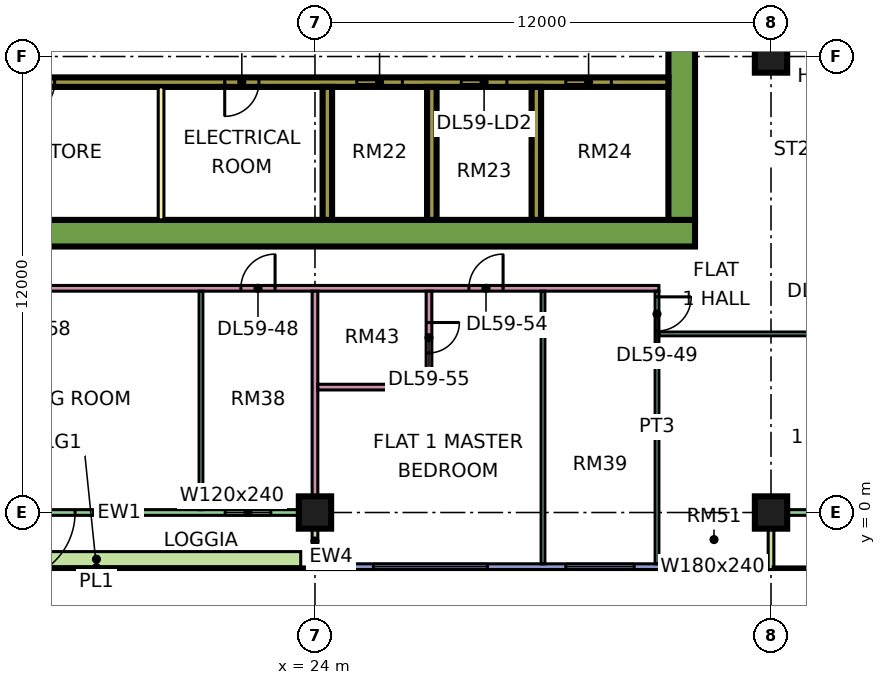
"""IFC4 building model, lengths in metres.
Left out: names, types, materials, properties, quantities, classifications, styles, units other than length and angle.
Written with IfcOpenShell. Run it as: python <this file> out.ifc"""

import sys

from ifc_helpers import new_model, si_unit, direction, frame, frame_2d, origin, origin_2d, place, context, subcontext, project, spatial, rectangle, extrude, element, fill, save


model = new_model("IFC4")
c1 = context("Model", 3, precision=1e-05, world=origin(), true_north=direction((0.0, 1.0)))
c2 = subcontext(c1, "Body", "Model", "MODEL_VIEW")
j1 = project(units=[si_unit("LENGTHUNIT", "METRE"), si_unit("PLANEANGLEUNIT", "RADIAN")], contexts=[c1])
p1 = place(None, origin())
s1 = spatial("IfcSite", under=j1, at=p1, CompositionType="ELEMENT")
p2 = place(p1, origin())
s2 = spatial("IfcBuilding", under=s1, at=p2, CompositionType="ELEMENT")
p3 = place(p2, frame((0.0, 0.0, 249.15)))
s3 = spatial("IfcBuildingStorey", under=s2, at=p3, CompositionType="ELEMENT", Elevation=249.15)
for number, where, z_axis, x_axis in (
    (1, (24.0, 0.0, 0.0), (0.0, 0.0, 1.0), (1.0, 0.0, 0.0)),
    (2, (36.0, 0.0, 0.0), (0.0, 0.0, 1.0), (1.0, 0.0, 0.0)),
    (3, (36.0, 12.0, 0.0), (0.0, 0.0, 1.0), (1.0, 0.0, 0.0)),
):
    element("IfcColumn", number, at=place(p3, frame(where, z_axis=z_axis, x_axis=x_axis)), inside=s3, PredefinedType="COLUMN", context=c2, shape_type="SweptSolid", body=[
        extrude(rectangle(XDim=0.85, YDim=0.85, at=origin_2d()), origin(), (0.0, 0.0, 1.0), 3.75),
    ])
p4 = place(p3, frame((9.0, 7.35, 0.0), z_axis=(0.0, 0.0, 1.0), x_axis=(1.0, 0.0, 0.0)))
e4 = element("IfcWall", 4, at=p4, inside=s3, PredefinedType="SHEAR", context=c2, shape_type="SweptSolid", body=[
    extrude(rectangle(XDim=25.0, YDim=0.7, at=frame_2d((12.5, 0.0))), origin(), (0.0, 0.0, 1.0), 3.75),
])
p5 = place(p3, frame((33.65, 7.7, 0.0), z_axis=(0.0, 0.0, 1.0), x_axis=(0.0, 1.0, 0.0)))
e5 = element("IfcWall", 5, at=p5, inside=s3, PredefinedType="SHEAR", context=c2, shape_type="SweptSolid", body=[
    extrude(rectangle(XDim=11.6, YDim=0.7, at=frame_2d((5.8, 0.0))), origin(), (0.0, 0.0, 1.0), 3.75),
])
p6 = place(p5, frame((5.5, 0.0, 0.0)))
e6 = element("IfcOpeningElement", 6, at=p6, cuts=e5, PredefinedType="OPENING", context=c2, shape_type="SweptSolid", body=[
    extrude(rectangle(XDim=1.8, YDim=2.4, at=frame_2d((0.9, 1.2))), frame((0.0, 0.36, 0.0), z_axis=(0.0, -1.0, 0.0), x_axis=(1.0, 0.0, 0.0)), (0.0, 0.0, 1.0), 0.72),
])
p7 = place(p3, frame((13.45, 11.325, 0.0), z_axis=(0.0, 0.0, 1.0), x_axis=(1.0, 0.0, 0.0)))
e7 = element("IfcWall", 7, at=p7, inside=s3, PredefinedType="SHEAR", context=c2, shape_type="SweptSolid", body=[
    extrude(rectangle(XDim=19.85, YDim=0.25, at=frame_2d((9.925, 0.0))), origin(), (0.0, 0.0, 1.0), 3.75),
])
p8 = place(p7, frame((11.65, 0.0, 0.0)))
e8 = element("IfcOpeningElement", 8, at=p8, cuts=e7, PredefinedType="OPENING", context=c2, shape_type="SweptSolid", body=[
    extrude(rectangle(XDim=1.2, YDim=2.2, at=frame_2d((0.6, 1.1))), frame((0.0, 0.135, 0.0), z_axis=(0.0, -1.0, 0.0), x_axis=(1.0, 0.0, 0.0)), (0.0, 0.0, 1.0), 0.27),
])
p9 = place(p7, frame((14.4, 0.0, 0.0)))
e9 = element("IfcOpeningElement", 9, at=p9, cuts=e7, PredefinedType="OPENING", context=c2, shape_type="SweptSolid", body=[
    extrude(rectangle(XDim=1.2, YDim=2.2, at=frame_2d((0.6, 1.1))), frame((0.0, 0.135, 0.0), z_axis=(0.0, -1.0, 0.0), x_axis=(1.0, 0.0, 0.0)), (0.0, 0.0, 1.0), 0.27),
])
p10 = place(p7, frame((17.15, 0.0, 0.0)))
e10 = element("IfcOpeningElement", 10, at=p10, cuts=e7, PredefinedType="OPENING", context=c2, shape_type="SweptSolid", body=[
    extrude(rectangle(XDim=1.2, YDim=2.2, at=frame_2d((0.6, 1.1))), frame((0.0, 0.135, 0.0), z_axis=(0.0, -1.0, 0.0), x_axis=(1.0, 0.0, 0.0)), (0.0, 0.0, 1.0), 0.27),
])
p11 = place(p7, frame((2.8, 0.0, 0.0)))
e11 = element("IfcOpeningElement", 11, at=p11, cuts=e7, PredefinedType="OPENING", context=c2, shape_type="SweptSolid", body=[
    extrude(rectangle(XDim=0.9, YDim=2.1, at=frame_2d((0.45, 1.05))), frame((0.0, 0.135, 0.0), z_axis=(0.0, -1.0, 0.0), x_axis=(1.0, 0.0, 0.0)), (0.0, 0.0, 1.0), 0.27),
])
p12 = place(p7, frame((8.175, 0.0, 0.0)))
e12 = element("IfcOpeningElement", 12, at=p12, cuts=e7, PredefinedType="OPENING", context=c2, shape_type="SweptSolid", body=[
    extrude(rectangle(XDim=0.9, YDim=2.1, at=frame_2d((0.45, 1.05))), frame((0.0, 0.135, 0.0), z_axis=(0.0, -1.0, 0.0), x_axis=(1.0, 0.0, 0.0)), (0.0, 0.0, 1.0), 0.27),
])
for number, where, z_axis, x_axis in (
    (13, (24.325, 7.7, 0.0), (0.0, 0.0, 1.0), (0.0, 1.0, 0.0)),
    (14, (27.075, 7.7, 0.0), (0.0, 0.0, 1.0), (0.0, 1.0, 0.0)),
    (15, (29.825, 7.7, 0.0), (0.0, 0.0, 1.0), (0.0, 1.0, 0.0)),
):
    element("IfcWall", number, at=place(p3, frame(where, z_axis=z_axis, x_axis=x_axis)), inside=s3, PredefinedType="SHEAR", context=c2, shape_type="SweptSolid", body=[
        extrude(rectangle(XDim=3.5, YDim=0.25, at=frame_2d((1.75, 0.0))), origin(), (0.0, 0.0, 1.0), 3.75),
    ])
p13 = place(p3, frame((12.575, 0.0, 0.0), z_axis=(0.0, 0.0, 1.0), x_axis=(1.0, 0.0, 0.0)))
e16 = element("IfcWall", 16, at=p13, inside=s3, PredefinedType="SOLIDWALL", context=c2, shape_type="SweptSolid", body=[
    extrude(rectangle(XDim=11.35, YDim=0.15, at=frame_2d((5.675, 0.0))), origin(), (0.0, 0.0, 1.0), 3.35),
])
p14 = place(p13, frame((3.312, 0.0, 0.0)))
e17 = element("IfcOpeningElement", 17, at=p14, cuts=e16, PredefinedType="OPENING", context=c2, shape_type="SweptSolid", body=[
    extrude(rectangle(XDim=1.8, YDim=2.4, at=frame_2d((0.9, 1.2))), frame((0.0, 0.085, 0.0), z_axis=(0.0, -1.0, 0.0), x_axis=(1.0, 0.0, 0.0)), (0.0, 0.0, 1.0), 0.17),
])
p15 = place(p13, frame((9.062, 0.0, 0.45)))
e18 = element("IfcOpeningElement", 18, at=p15, cuts=e16, PredefinedType="OPENING", context=c2, shape_type="SweptSolid", body=[
    extrude(rectangle(XDim=1.2, YDim=2.4, at=frame_2d((0.6, 1.2))), frame((0.0, 0.085, 0.0), z_axis=(0.0, -1.0, 0.0), x_axis=(1.0, 0.0, 0.0)), (0.0, 0.0, 1.0), 0.17),
])
p16 = place(p3, frame((24.0, -1.5, 0.0), z_axis=(0.0, 0.0, 1.0), x_axis=(0.0, 1.0, 0.0)))
e19 = element("IfcWall", 19, at=p16, inside=s3, PredefinedType="SOLIDWALL", context=c2, shape_type="SweptSolid", body=[
    extrude(rectangle(XDim=1.5, YDim=0.15, at=frame_2d((0.75, 0.0))), origin(), (0.0, 0.0, 1.0), 3.35),
])
p17 = place(p3, frame((24.075, -1.425, 0.0), z_axis=(0.0, 0.0, 1.0), x_axis=(1.0, 0.0, 0.0)))
e20 = element("IfcWall", 20, at=p17, inside=s3, PredefinedType="SOLIDWALL", context=c2, shape_type="SweptSolid", body=[
    extrude(rectangle(XDim=11.85, YDim=0.15, at=frame_2d((5.925, 0.0))), origin(), (0.0, 0.0, 1.0), 3.35),
])
p18 = place(p17, frame((1.462, 0.0, 0.45)))
e21 = element("IfcOpeningElement", 21, at=p18, cuts=e20, PredefinedType="OPENING", context=c2, shape_type="SweptSolid", body=[
    extrude(rectangle(XDim=3.0, YDim=2.4, at=frame_2d((1.5, 1.2))), frame((0.0, 0.085, 0.0), z_axis=(0.0, -1.0, 0.0), x_axis=(1.0, 0.0, 0.0)), (0.0, 0.0, 1.0), 0.17),
])
p19 = place(p17, frame((6.525, 0.0, 0.45)))
e22 = element("IfcOpeningElement", 22, at=p19, cuts=e20, PredefinedType="OPENING", context=c2, shape_type="SweptSolid", body=[
    extrude(rectangle(XDim=1.8, YDim=2.4, at=frame_2d((0.9, 1.2))), frame((0.0, 0.085, 0.0), z_axis=(0.0, -1.0, 0.0), x_axis=(1.0, 0.0, 0.0)), (0.0, 0.0, 1.0), 0.17),
])
p20 = place(p17, frame((9.488, 0.0, 0.45)))
e23 = element("IfcOpeningElement", 23, at=p20, cuts=e20, PredefinedType="OPENING", context=c2, shape_type="SweptSolid", body=[
    extrude(rectangle(XDim=1.8, YDim=2.4, at=frame_2d((0.9, 1.2))), frame((0.0, 0.085, 0.0), z_axis=(0.0, -1.0, 0.0), x_axis=(1.0, 0.0, 0.0)), (0.0, 0.0, 1.0), 0.17),
])
p21 = place(p3, frame((36.075, 0.0, 0.0), z_axis=(0.0, 0.0, 1.0), x_axis=(1.0, 0.0, 0.0)))
e24 = element("IfcWall", 24, at=p21, inside=s3, PredefinedType="SOLIDWALL", context=c2, shape_type="SweptSolid", body=[
    extrude(rectangle(XDim=11.85, YDim=0.15, at=frame_2d((5.925, 0.0))), origin(), (0.0, 0.0, 1.0), 3.35),
])
p22 = place(p21, frame((2.288, 0.0, 0.0)))
e25 = element("IfcOpeningElement", 25, at=p22, cuts=e24, PredefinedType="OPENING", context=c2, shape_type="SweptSolid", body=[
    extrude(rectangle(XDim=1.8, YDim=2.4, at=frame_2d((0.9, 1.2))), frame((0.0, 0.085, 0.0), z_axis=(0.0, -1.0, 0.0), x_axis=(1.0, 0.0, 0.0)), (0.0, 0.0, 1.0), 0.17),
])
p23 = place(p21, frame((6.562, 0.0, 0.45)))
e26 = element("IfcOpeningElement", 26, at=p23, cuts=e24, PredefinedType="OPENING", context=c2, shape_type="SweptSolid", body=[
    extrude(rectangle(XDim=1.2, YDim=2.4, at=frame_2d((0.6, 1.2))), frame((0.0, 0.085, 0.0), z_axis=(0.0, -1.0, 0.0), x_axis=(1.0, 0.0, 0.0)), (0.0, 0.0, 1.0), 0.17),
])
p24 = place(p21, frame((10.05, 0.0, 0.45)))
e27 = element("IfcOpeningElement", 27, at=p24, cuts=e24, PredefinedType="OPENING", context=c2, shape_type="SweptSolid", body=[
    extrude(rectangle(XDim=1.2, YDim=2.4, at=frame_2d((0.6, 1.2))), frame((0.0, 0.085, 0.0), z_axis=(0.0, -1.0, 0.0), x_axis=(1.0, 0.0, 0.0)), (0.0, 0.0, 1.0), 0.17),
])
p25 = place(p3, frame((36.0, -1.5, 0.0), z_axis=(0.0, 0.0, 1.0), x_axis=(0.0, 1.0, 0.0)))
e28 = element("IfcWall", 28, at=p25, inside=s3, PredefinedType="SOLIDWALL", context=c2, shape_type="SweptSolid", body=[
    extrude(rectangle(XDim=1.5, YDim=0.15, at=frame_2d((0.75, 0.0))), origin(), (0.0, 0.0, 1.0), 3.35),
])
p26 = place(p3, frame((12.875, -1.229, 0.0), z_axis=(0.0, 0.0, 1.0), x_axis=(1.0, 0.0, 0.0)))
e29 = element("IfcWall", 29, at=p26, inside=s3, PredefinedType="SOLIDWALL", context=c2, shape_type="SweptSolid", body=[
    extrude(rectangle(XDim=10.75, YDim=0.4, at=frame_2d((5.375, 0.0))), origin(), (0.0, 0.0, 1.0), 0.7),
])
p27 = place(p3, frame((19.95, 7.7, 0.0), z_axis=(0.0, 0.0, 1.0), x_axis=(0.0, 1.0, 0.0)))
e30 = element("IfcWall", 30, at=p27, inside=s3, PredefinedType="PARTITIONING", context=c2, shape_type="SweptSolid", body=[
    extrude(rectangle(XDim=3.5, YDim=0.15, at=frame_2d((1.75, 0.0))), origin(), (0.0, 0.0, 1.0), 3.35),
])
p28 = place(p3, frame((11.95, 5.9, 0.0), z_axis=(0.0, 0.0, 1.0), x_axis=(1.0, 0.0, 0.0)))
e31 = element("IfcWall", 31, at=p28, inside=s3, PredefinedType="PARTITIONING", context=c2, shape_type="SweptSolid", body=[
    extrude(rectangle(XDim=21.1, YDim=0.15, at=frame_2d((10.55, 0.0))), origin(), (0.0, 0.0, 1.0), 3.35),
])
p29 = place(p28, frame((10.1, 0.0, 0.0)))
e32 = element("IfcOpeningElement", 32, at=p29, cuts=e31, PredefinedType="OPENING", context=c2, shape_type="SweptSolid", body=[
    extrude(rectangle(XDim=0.9, YDim=2.1, at=frame_2d((0.45, 1.05))), frame((0.0, 0.085, 0.0), z_axis=(0.0, -1.0, 0.0), x_axis=(1.0, 0.0, 0.0)), (0.0, 0.0, 1.0), 0.17),
])
p30 = place(p28, frame((16.1, 0.0, 0.0)))
e33 = element("IfcOpeningElement", 33, at=p30, cuts=e31, PredefinedType="OPENING", context=c2, shape_type="SweptSolid", body=[
    extrude(rectangle(XDim=0.9, YDim=2.1, at=frame_2d((0.45, 1.05))), frame((0.0, 0.085, 0.0), z_axis=(0.0, -1.0, 0.0), x_axis=(1.0, 0.0, 0.0)), (0.0, 0.0, 1.0), 0.17),
])
p31 = place(p28, frame((4.1, 0.0, 0.0)))
e34 = element("IfcOpeningElement", 34, at=p31, cuts=e31, PredefinedType="OPENING", context=c2, shape_type="SweptSolid", body=[
    extrude(rectangle(XDim=0.9, YDim=2.1, at=frame_2d((0.45, 1.05))), frame((0.0, 0.085, 0.0), z_axis=(0.0, -1.0, 0.0), x_axis=(1.0, 0.0, 0.0)), (0.0, 0.0, 1.0), 0.17),
])
p32 = place(p3, frame((21.0, 0.074, 0.0), z_axis=(0.0, 0.0, 1.0), x_axis=(0.0, 1.0, 0.0)))
e35 = element("IfcWall", 35, at=p32, inside=s3, PredefinedType="PARTITIONING", context=c2, shape_type="SweptSolid", body=[
    extrude(rectangle(XDim=5.751, YDim=0.1, at=frame_2d((2.875, 0.0))), origin(), (0.0, 0.0, 1.0), 3.35),
])
p33 = place(p3, frame((24.0, 0.0, 0.0), z_axis=(0.0, 0.0, 1.0), x_axis=(0.0, 1.0, 0.0)))
e36 = element("IfcWall", 36, at=p33, inside=s3, PredefinedType="PARTITIONING", context=c2, shape_type="SweptSolid", body=[
    extrude(rectangle(XDim=5.825, YDim=0.15, at=frame_2d((2.913, 0.0))), origin(), (0.0, 0.0, 1.0), 3.35),
])
p34 = place(p3, frame((24.075, 3.3, 0.0), z_axis=(0.0, 0.0, 1.0), x_axis=(1.0, 0.0, 0.0)))
e37 = element("IfcWall", 37, at=p34, inside=s3, PredefinedType="PARTITIONING", context=c2, shape_type="SweptSolid", body=[
    extrude(rectangle(XDim=3.0, YDim=0.15, at=frame_2d((1.5, 0.0))), origin(), (0.0, 0.0, 1.0), 3.35),
])
p35 = place(p3, frame((27.0, 3.375, 0.0), z_axis=(0.0, 0.0, 1.0), x_axis=(0.0, 1.0, 0.0)))
e38 = element("IfcWall", 38, at=p35, inside=s3, PredefinedType="PARTITIONING", context=c2, shape_type="SweptSolid", body=[
    extrude(rectangle(XDim=2.45, YDim=0.15, at=frame_2d((1.225, 0.0))), origin(), (0.0, 0.0, 1.0), 3.35),
])
p36 = place(p35, frame((0.825, 0.0, 0.0)))
e39 = element("IfcOpeningElement", 39, at=p36, cuts=e38, PredefinedType="OPENING", context=c2, shape_type="SweptSolid", body=[
    extrude(rectangle(XDim=0.8, YDim=2.1, at=frame_2d((0.4, 1.05))), frame((0.0, 0.085, 0.0), z_axis=(0.0, -1.0, 0.0), x_axis=(1.0, 0.0, 0.0)), (0.0, 0.0, 1.0), 0.17),
])
p37 = place(p3, frame((30.0, -1.351, 0.0), z_axis=(0.0, 0.0, 1.0), x_axis=(0.0, 1.0, 0.0)))
e40 = element("IfcWall", 40, at=p37, inside=s3, PredefinedType="PARTITIONING", context=c2, shape_type="SweptSolid", body=[
    extrude(rectangle(XDim=7.176, YDim=0.1, at=frame_2d((3.588, 0.0))), origin(), (0.0, 0.0, 1.0), 3.35),
])
p38 = place(p3, frame((33.0, -1.35, 0.0), z_axis=(0.0, 0.0, 1.0), x_axis=(0.0, 1.0, 0.0)))
e41 = element("IfcWall", 41, at=p38, inside=s3, PredefinedType="PARTITIONING", context=c2, shape_type="SweptSolid", body=[
    extrude(rectangle(XDim=7.175, YDim=0.1, at=frame_2d((3.587, 0.0))), origin(), (0.0, 0.0, 1.0), 3.35),
])
p39 = place(p38, frame((6.125, 0.0, 0.0)))
e42 = element("IfcOpeningElement", 42, at=p39, cuts=e41, PredefinedType="OPENING", context=c2, shape_type="SweptSolid", body=[
    extrude(rectangle(XDim=0.9, YDim=2.1, at=frame_2d((0.45, 1.05))), frame((0.0, 0.06, 0.0), z_axis=(0.0, -1.0, 0.0), x_axis=(1.0, 0.0, 0.0)), (0.0, 0.0, 1.0), 0.12),
])
p40 = place(p3, frame((33.05, 4.7, 0.0), z_axis=(0.0, 0.0, 1.0), x_axis=(1.0, 0.0, 0.0)))
e43 = element("IfcWall", 43, at=p40, inside=s3, PredefinedType="PARTITIONING", context=c2, shape_type="SweptSolid", body=[
    extrude(rectangle(XDim=14.85, YDim=0.1, at=frame_2d((7.425, 0.0))), origin(), (0.0, 0.0, 1.0), 3.35),
])
p41 = place(p40, frame((10.0, 0.0, 0.0)))
e44 = element("IfcOpeningElement", 44, at=p41, cuts=e43, PredefinedType="OPENING", context=c2, shape_type="SweptSolid", body=[
    extrude(rectangle(XDim=0.9, YDim=2.1, at=frame_2d((0.45, 1.05))), frame((0.0, 0.06, 0.0), z_axis=(0.0, -1.0, 0.0), x_axis=(1.0, 0.0, 0.0)), (0.0, 0.0, 1.0), 0.12),
])
p42 = place(p40, frame((13.0, 0.0, 0.0)))
e45 = element("IfcOpeningElement", 45, at=p42, cuts=e43, PredefinedType="OPENING", context=c2, shape_type="SweptSolid", body=[
    extrude(rectangle(XDim=0.9, YDim=2.1, at=frame_2d((0.45, 1.05))), frame((0.0, 0.06, 0.0), z_axis=(0.0, -1.0, 0.0), x_axis=(1.0, 0.0, 0.0)), (0.0, 0.0, 1.0), 0.12),
])
p43 = place(p40, frame((4.0, 0.0, 0.0)))
e46 = element("IfcOpeningElement", 46, at=p43, cuts=e43, PredefinedType="OPENING", context=c2, shape_type="SweptSolid", body=[
    extrude(rectangle(XDim=0.9, YDim=2.1, at=frame_2d((0.45, 1.05))), frame((0.0, 0.06, 0.0), z_axis=(0.0, -1.0, 0.0), x_axis=(1.0, 0.0, 0.0)), (0.0, 0.0, 1.0), 0.12),
])
p44 = place(p14, frame((1.8, 0.0, 0.0), z_axis=(0.0, 0.0, 1.0), x_axis=(-1.0, 0.0, 0.0)))
e47 = element("IfcDoor", 47, at=p44, inside=s3, OperationType="DOUBLE_DOOR_SINGLE_SWING", PredefinedType="DOOR", context=c2, shape_type="SweptSolid", body=[
    extrude(rectangle(XDim=1.8, YDim=2.4, at=frame_2d((0.9, 1.2))), frame((0.0, 0.025, 0.0), z_axis=(0.0, -1.0, 0.0), x_axis=(1.0, 0.0, 0.0)), (0.0, 0.0, 1.0), 0.05),
])
fill(e17, e47)
p45 = place(p15, origin())
e48 = element("IfcWindow", 48, at=p45, inside=s3, PartitioningType="SINGLE_PANEL", PredefinedType="WINDOW", context=c2, shape_type="SweptSolid", body=[
    extrude(rectangle(XDim=1.2, YDim=2.4, at=frame_2d((0.6, 1.2))), frame((0.0, 0.03, 0.0), z_axis=(0.0, -1.0, 0.0), x_axis=(1.0, 0.0, 0.0)), (0.0, 0.0, 1.0), 0.06),
])
fill(e18, e48)
p46 = place(p18, origin())
e49 = element("IfcWindow", 49, at=p46, inside=s3, PartitioningType="SINGLE_PANEL", PredefinedType="WINDOW", context=c2, shape_type="SweptSolid", body=[
    extrude(rectangle(XDim=3.0, YDim=2.4, at=frame_2d((1.5, 1.2))), frame((0.0, 0.03, 0.0), z_axis=(0.0, -1.0, 0.0), x_axis=(1.0, 0.0, 0.0)), (0.0, 0.0, 1.0), 0.06),
])
fill(e21, e49)
p47 = place(p19, origin())
e50 = element("IfcWindow", 50, at=p47, inside=s3, PartitioningType="SINGLE_PANEL", PredefinedType="WINDOW", context=c2, shape_type="SweptSolid", body=[
    extrude(rectangle(XDim=1.8, YDim=2.4, at=frame_2d((0.9, 1.2))), frame((0.0, 0.03, 0.0), z_axis=(0.0, -1.0, 0.0), x_axis=(1.0, 0.0, 0.0)), (0.0, 0.0, 1.0), 0.06),
])
fill(e22, e50)
p48 = place(p20, origin())
e51 = element("IfcWindow", 51, at=p48, inside=s3, PartitioningType="SINGLE_PANEL", PredefinedType="WINDOW", context=c2, shape_type="SweptSolid", body=[
    extrude(rectangle(XDim=1.8, YDim=2.4, at=frame_2d((0.9, 1.2))), frame((0.0, 0.03, 0.0), z_axis=(0.0, -1.0, 0.0), x_axis=(1.0, 0.0, 0.0)), (0.0, 0.0, 1.0), 0.06),
])
fill(e23, e51)
p49 = place(p8, origin())
e52 = element("IfcDoor", 52, at=p49, inside=s3, OperationType="DOUBLE_DOOR_SLIDING", PredefinedType="DOOR", context=c2, shape_type="SweptSolid", body=[
    extrude(rectangle(XDim=1.2, YDim=2.2, at=frame_2d((0.6, 1.1))), frame((0.0, 0.025, 0.0), z_axis=(0.0, -1.0, 0.0), x_axis=(1.0, 0.0, 0.0)), (0.0, 0.0, 1.0), 0.05),
])
fill(e8, e52)
p50 = place(p9, origin())
e53 = element("IfcDoor", 53, at=p50, inside=s3, OperationType="DOUBLE_DOOR_SLIDING", PredefinedType="DOOR", context=c2, shape_type="SweptSolid", body=[
    extrude(rectangle(XDim=1.2, YDim=2.2, at=frame_2d((0.6, 1.1))), frame((0.0, 0.025, 0.0), z_axis=(0.0, -1.0, 0.0), x_axis=(1.0, 0.0, 0.0)), (0.0, 0.0, 1.0), 0.05),
])
fill(e9, e53)
p51 = place(p10, origin())
e54 = element("IfcDoor", 54, at=p51, inside=s3, OperationType="DOUBLE_DOOR_SLIDING", PredefinedType="DOOR", context=c2, shape_type="SweptSolid", body=[
    extrude(rectangle(XDim=1.2, YDim=2.2, at=frame_2d((0.6, 1.1))), frame((0.0, 0.025, 0.0), z_axis=(0.0, -1.0, 0.0), x_axis=(1.0, 0.0, 0.0)), (0.0, 0.0, 1.0), 0.05),
])
fill(e10, e54)
p52 = place(p11, frame((0.9, 0.0, 0.0), z_axis=(0.0, 0.0, 1.0), x_axis=(-1.0, 0.0, 0.0)))
e55 = element("IfcDoor", 55, at=p52, inside=s3, OperationType="SINGLE_SWING_LEFT", PredefinedType="DOOR", context=c2, shape_type="SweptSolid", body=[
    extrude(rectangle(XDim=0.9, YDim=2.1, at=frame_2d((0.45, 1.05))), frame((0.0, 0.025, 0.0), z_axis=(0.0, -1.0, 0.0), x_axis=(1.0, 0.0, 0.0)), (0.0, 0.0, 1.0), 0.05),
])
fill(e11, e55)
p53 = place(p12, frame((0.9, 0.0, 0.0), z_axis=(0.0, 0.0, 1.0), x_axis=(-1.0, 0.0, 0.0)))
e56 = element("IfcDoor", 56, at=p53, inside=s3, OperationType="SINGLE_SWING_LEFT", PredefinedType="DOOR", context=c2, shape_type="SweptSolid", body=[
    extrude(rectangle(XDim=0.9, YDim=2.1, at=frame_2d((0.45, 1.05))), frame((0.0, 0.025, 0.0), z_axis=(0.0, -1.0, 0.0), x_axis=(1.0, 0.0, 0.0)), (0.0, 0.0, 1.0), 0.05),
])
fill(e12, e56)
p54 = place(p29, frame((0.9, 0.0, 0.0), z_axis=(0.0, 0.0, 1.0), x_axis=(-1.0, 0.0, 0.0)))
e57 = element("IfcDoor", 57, at=p54, inside=s3, OperationType="SINGLE_SWING_RIGHT", PredefinedType="DOOR", context=c2, shape_type="SweptSolid", body=[
    extrude(rectangle(XDim=0.9, YDim=2.1, at=frame_2d((0.45, 1.05))), frame((0.0, 0.025, 0.0), z_axis=(0.0, -1.0, 0.0), x_axis=(1.0, 0.0, 0.0)), (0.0, 0.0, 1.0), 0.05),
])
fill(e32, e57)
p55 = place(p39, origin())
e58 = element("IfcDoor", 58, at=p55, inside=s3, OperationType="SINGLE_SWING_RIGHT", PredefinedType="DOOR", context=c2, shape_type="SweptSolid", body=[
    extrude(rectangle(XDim=0.9, YDim=2.1, at=frame_2d((0.45, 1.05))), frame((0.0, 0.025, 0.0), z_axis=(0.0, -1.0, 0.0), x_axis=(1.0, 0.0, 0.0)), (0.0, 0.0, 1.0), 0.05),
])
fill(e42, e58)
p56 = place(p30, frame((0.9, 0.0, 0.0), z_axis=(0.0, 0.0, 1.0), x_axis=(-1.0, 0.0, 0.0)))
e59 = element("IfcDoor", 59, at=p56, inside=s3, OperationType="SINGLE_SWING_RIGHT", PredefinedType="DOOR", context=c2, shape_type="SweptSolid", body=[
    extrude(rectangle(XDim=0.9, YDim=2.1, at=frame_2d((0.45, 1.05))), frame((0.0, 0.025, 0.0), z_axis=(0.0, -1.0, 0.0), x_axis=(1.0, 0.0, 0.0)), (0.0, 0.0, 1.0), 0.05),
])
fill(e33, e59)
p57 = place(p36, origin())
e60 = element("IfcDoor", 60, at=p57, inside=s3, OperationType="SINGLE_SWING_RIGHT", PredefinedType="DOOR", context=c2, shape_type="SweptSolid", body=[
    extrude(rectangle(XDim=0.8, YDim=2.1, at=frame_2d((0.4, 1.05))), frame((0.0, 0.025, 0.0), z_axis=(0.0, -1.0, 0.0), x_axis=(1.0, 0.0, 0.0)), (0.0, 0.0, 1.0), 0.05),
])
fill(e39, e60)
save(model, sys.argv[1])
